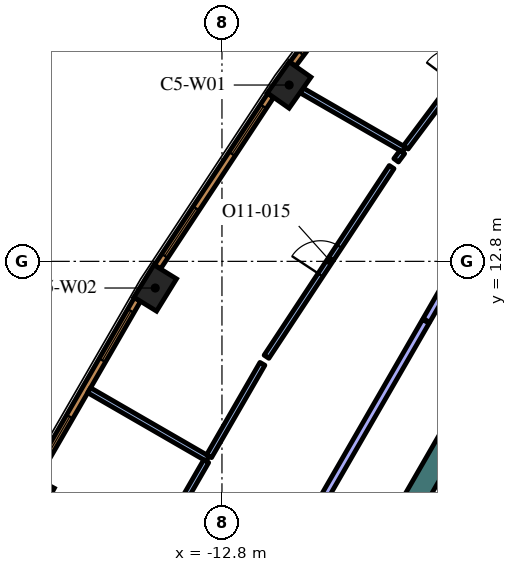
"""IFC4 building model, lengths in metres.
Left out: names, types, materials, properties, quantities, classifications, styles, units other than length and angle.
Written with IfcOpenShell. Run it as: python <this file> out.ifc"""

import sys

from ifc_helpers import new_model, si_unit, direction, frame, frame_2d, origin, origin_2d, place, context, subcontext, project, spatial, rectangle, extrude, element, fill, save


model = new_model("IFC4")
c1 = context("Model", 3, precision=1e-05, world=origin(), true_north=direction((0.0, 1.0)))
c2 = subcontext(c1, "Body", "Model", "MODEL_VIEW")
j1 = project(units=[si_unit("LENGTHUNIT", "METRE"), si_unit("PLANEANGLEUNIT", "RADIAN")], contexts=[c1])
p1 = place(None, origin())
s1 = spatial("IfcSite", under=j1, at=p1, CompositionType="ELEMENT")
p2 = place(p1, origin())
s2 = spatial("IfcBuilding", under=s1, at=p2, CompositionType="ELEMENT")
p3 = place(p2, frame((0.0, 0.0, 275.4)))
s3 = spatial("IfcBuildingStorey", under=s2, at=p3, CompositionType="ELEMENT", Elevation=275.4)
for number, where, z_axis, x_axis in (
    (1, (-11.032, 17.44, 0.0), (0.0, 0.0, 1.0), (-0.575, -0.818, 0.0)),
    (2, (-14.556, 12.098, 0.0), (0.0, 0.0, 1.0), (-0.526, -0.851, 0.0)),
    (3, (-17.756, 6.557, 0.0), (0.0, 0.0, 1.0), (-0.474, -0.881, 0.0)),
):
    element("IfcColumn", number, at=place(p3, frame(where, z_axis=z_axis, x_axis=x_axis)), inside=s3, PredefinedType="COLUMN", context=c2, shape_type="SweptSolid", body=[
        extrude(rectangle(XDim=1.0, YDim=0.7, at=origin_2d()), origin(), (0.0, 0.0, 1.0), 4.2),
    ])
p4 = place(p3, frame((-4.234, 12.566, 0.0), z_axis=(0.0, 0.0, 1.0), x_axis=(-0.499998841866, -0.866026072432, 0.0)))
e4 = element("IfcWall", 4, at=p4, inside=s3, PredefinedType="SOLIDWALL", context=c2, shape_type="SweptSolid", body=[
    extrude(rectangle(XDim=16.694, YDim=0.6, at=frame_2d((8.347, 0.0))), origin(), (0.0, 0.0, 1.0), 4.2),
])
p5 = place(p3, frame((-3.02, 7.419, 0.0), z_axis=(0.0, 0.0, 1.0), x_axis=(-0.500022956343, -0.866012149528, 0.0)))
e5 = element("IfcWall", 5, at=p5, inside=s3, PredefinedType="SOLIDWALL", context=c2, shape_type="SweptSolid", body=[
    extrude(rectangle(XDim=10.08, YDim=0.25, at=frame_2d((5.04, 0.0))), origin(), (0.0, 0.0, 1.0), 4.2),
])
p6 = place(p3, frame((-8.007, 15.74, 0.0), z_axis=(0.0, 0.0, 1.0), x_axis=(-0.866044607523, 0.499966736674, 0.0)))
e6 = element("IfcWall", 6, at=p6, inside=s3, PredefinedType="PARTITIONING", context=c2, shape_type="SweptSolid", body=[
    extrude(rectangle(XDim=3.115, YDim=0.15, at=frame_2d((1.557, 0.0))), origin(), (0.0, 0.0, 1.0), 3.55),
])
p7 = place(p3, frame((-7.962, 15.8, 0.0), z_axis=(0.0, 0.0, 1.0), x_axis=(0.599528135832, 0.800353680785, 0.0)))
e7 = element("IfcWall", 7, at=p7, inside=s3, PredefinedType="PARTITIONING", context=c2, shape_type="SweptSolid", body=[
    extrude(rectangle(XDim=5.217, YDim=0.15, at=frame_2d((2.608, 0.0))), origin(), (0.0, 0.0, 1.0), 3.55),
])
p8 = place(p7, frame((2.116, 0.0, 0.0)))
e8 = element("IfcOpeningElement", 8, at=p8, cuts=e7, PredefinedType="OPENING", context=c2, shape_type="SweptSolid", body=[
    extrude(rectangle(XDim=0.9, YDim=2.1, at=frame_2d((0.45, 1.05))), frame((0.0, 0.085, 0.0), z_axis=(0.0, -1.0, 0.0), x_axis=(1.0, 0.0, 0.0)), (0.0, 0.0, 1.0), 0.17),
])
p9 = place(p3, frame((-13.177, 7.608, 0.0), z_axis=(0.0, 0.0, 1.0), x_axis=(-0.866018442252, 0.500012057535, 0.0)))
e9 = element("IfcWall", 9, at=p9, inside=s3, PredefinedType="PARTITIONING", context=c2, shape_type="SweptSolid", body=[
    extrude(rectangle(XDim=3.6, YDim=0.15, at=frame_2d((1.8, 0.0))), origin(), (0.0, 0.0, 1.0), 3.55),
])
p10 = place(p3, frame((-8.052, 15.679, 0.0), z_axis=(0.0, 0.0, 1.0), x_axis=(-0.599004157744, -0.800745914136, 0.0)))
e10 = element("IfcWall", 10, at=p10, inside=s3, PredefinedType="PARTITIONING", context=c2, shape_type="SweptSolid", body=[
    extrude(rectangle(XDim=0.275, YDim=0.15, at=frame_2d((0.137, 0.0))), origin(), (0.0, 0.0, 1.0), 3.55),
])
p11 = place(p3, frame((-11.628, 10.29, 0.0), z_axis=(0.0, 0.0, 1.0), x_axis=(0.55074607557, 0.834672846236, 0.0)))
e11 = element("IfcWall", 11, at=p11, inside=s3, PredefinedType="PARTITIONING", context=c2, shape_type="SweptSolid", body=[
    extrude(rectangle(XDim=5.979, YDim=0.15, at=frame_2d((2.99, 0.0))), origin(), (0.0, 0.0, 1.0), 3.55),
])
p12 = place(p11, frame((2.58, 0.0, 0.0)))
e12 = element("IfcOpeningElement", 12, at=p12, cuts=e11, PredefinedType="OPENING", context=c2, shape_type="SweptSolid", body=[
    extrude(rectangle(XDim=0.9, YDim=2.1, at=frame_2d((0.45, 1.05))), frame((0.0, 0.085, 0.0), z_axis=(0.0, -1.0, 0.0), x_axis=(1.0, 0.0, 0.0)), (0.0, 0.0, 1.0), 0.17),
])
p13 = place(p3, frame((-11.736, 10.104, 0.0), z_axis=(0.0, 0.0, 1.0), x_axis=(-0.500011000363, -0.866019052629, 0.0)))
e13 = element("IfcWall", 13, at=p13, inside=s3, PredefinedType="PARTITIONING", context=c2, shape_type="SweptSolid", body=[
    extrude(rectangle(XDim=2.808, YDim=0.15, at=frame_2d((1.404, 0.0))), origin(), (0.0, 0.0, 1.0), 3.55),
])
p14 = place(p3, frame((-13.214, 7.543, 0.0), z_axis=(0.0, 0.0, 1.0), x_axis=(-0.499927597274, -0.866067201483, 0.0)))
e14 = element("IfcWall", 14, at=p14, inside=s3, PredefinedType="PARTITIONING", context=c2, shape_type="SweptSolid", body=[
    extrude(rectangle(XDim=3.022, YDim=0.15, at=frame_2d((1.511, 0.0))), origin(), (0.0, 0.0, 1.0), 3.55),
])
p15 = place(p3, frame((-7.436, 11.221, 0.0), z_axis=(0.0, 0.0, 1.0), x_axis=(-0.49999894854, -0.866026010844, 0.0)))
e15 = element("IfcWall", 15, at=p15, inside=s3, PredefinedType="PARTITIONING", context=c2, shape_type="SweptSolid", body=[
    extrude(rectangle(XDim=12.0, YDim=0.2, at=frame_2d((6.0, 0.0))), origin(), (0.0, 0.0, 1.0), 3.55),
])
p16 = place(p15, frame((5.5, 0.0, 0.0)))
e16 = element("IfcOpeningElement", 16, at=p16, cuts=e15, PredefinedType="OPENING", context=c2, shape_type="SweptSolid", body=[
    extrude(rectangle(XDim=1.0, YDim=2.1, at=frame_2d((0.5, 1.05))), frame((0.0, 0.11, 0.0), z_axis=(0.0, -1.0, 0.0), x_axis=(1.0, 0.0, 0.0)), (0.0, 0.0, 1.0), 0.22),
])
p17 = place(p3, frame((-3.306, 18.374, 0.0), z_axis=(0.0, 0.0, 1.0), x_axis=(-0.499999798456, -0.866025520146, 0.0)))
e17 = element("IfcWall", 17, at=p17, inside=s3, PredefinedType="PARTITIONING", context=c2, shape_type="SweptSolid", body=[
    extrude(rectangle(XDim=8.229, YDim=0.2, at=frame_2d((4.115, 0.0))), origin(), (0.0, 0.0, 1.0), 3.55),
])
p18 = place(p3, frame((-7.692, 22.324, 0.0), z_axis=(0.0, 0.0, 1.0), x_axis=(-0.599559865294, -0.800329911929, 0.0)))
e18 = element("IfcWall", 18, at=p18, inside=s3, PredefinedType="SOLIDWALL", context=c2, shape_type="SweptSolid", body=[
    extrude(rectangle(XDim=5.415, YDim=0.19, at=frame_2d((2.708, 0.0))), origin(), (0.0, 0.0, 1.0), 3.95),
])
p19 = place(p18, frame((0.323, 0.0, 0.6)))
e19 = element("IfcOpeningElement", 19, at=p19, cuts=e18, PredefinedType="OPENING", context=c2, shape_type="SweptSolid", body=[
    extrude(rectangle(XDim=1.5, YDim=2.85, at=frame_2d((0.75, 1.425))), frame((0.0, 0.105, 0.0), z_axis=(0.0, -1.0, 0.0), x_axis=(1.0, 0.0, 0.0)), (0.0, 0.0, 1.0), 0.21),
])
p20 = place(p18, frame((3.558, 0.0, 0.6)))
e20 = element("IfcOpeningElement", 20, at=p20, cuts=e18, PredefinedType="OPENING", context=c2, shape_type="SweptSolid", body=[
    extrude(rectangle(XDim=1.5, YDim=2.85, at=frame_2d((0.75, 1.425))), frame((0.0, 0.105, 0.0), z_axis=(0.0, -1.0, 0.0), x_axis=(1.0, 0.0, 0.0)), (0.0, 0.0, 1.0), 0.21),
])
p21 = place(p3, frame((-11.518, 17.166, 0.0), z_axis=(0.0, 0.0, 1.0), x_axis=(-0.550744054781, -0.83467417962, 0.0)))
e21 = element("IfcWall", 21, at=p21, inside=s3, PredefinedType="SOLIDWALL", context=c2, shape_type="SweptSolid", body=[
    extrude(rectangle(XDim=5.406, YDim=0.19, at=frame_2d((2.703, 0.0))), origin(), (0.0, 0.0, 1.0), 3.95),
])
p22 = place(p21, frame((0.346, 0.0, 0.6)))
e22 = element("IfcOpeningElement", 22, at=p22, cuts=e21, PredefinedType="OPENING", context=c2, shape_type="SweptSolid", body=[
    extrude(rectangle(XDim=1.5, YDim=2.85, at=frame_2d((0.75, 1.425))), frame((0.0, 0.105, 0.0), z_axis=(0.0, -1.0, 0.0), x_axis=(1.0, 0.0, 0.0)), (0.0, 0.0, 1.0), 0.21),
])
p23 = place(p21, frame((3.559, 0.0, 0.6)))
e23 = element("IfcOpeningElement", 23, at=p23, cuts=e21, PredefinedType="OPENING", context=c2, shape_type="SweptSolid", body=[
    extrude(rectangle(XDim=1.5, YDim=2.85, at=frame_2d((0.75, 1.425))), frame((0.0, 0.105, 0.0), z_axis=(0.0, -1.0, 0.0), x_axis=(1.0, 0.0, 0.0)), (0.0, 0.0, 1.0), 0.21),
])
p24 = place(p3, frame((-15.025, 11.796, 0.0), z_axis=(0.0, 0.0, 1.0), x_axis=(-0.500024767483, -0.866011103799, 0.0)))
e24 = element("IfcWall", 24, at=p24, inside=s3, PredefinedType="SOLIDWALL", context=c2, shape_type="SweptSolid", body=[
    extrude(rectangle(XDim=5.406, YDim=0.19, at=frame_2d((2.703, 0.0))), origin(), (0.0, 0.0, 1.0), 3.95),
])
p25 = place(p24, frame((0.346, 0.0, 0.6)))
e25 = element("IfcOpeningElement", 25, at=p25, cuts=e24, PredefinedType="OPENING", context=c2, shape_type="SweptSolid", body=[
    extrude(rectangle(XDim=1.5, YDim=2.85, at=frame_2d((0.75, 1.425))), frame((0.0, 0.105, 0.0), z_axis=(0.0, -1.0, 0.0), x_axis=(1.0, 0.0, 0.0)), (0.0, 0.0, 1.0), 0.21),
])
p26 = place(p24, frame((3.559, 0.0, 0.6)))
e26 = element("IfcOpeningElement", 26, at=p26, cuts=e24, PredefinedType="OPENING", context=c2, shape_type="SweptSolid", body=[
    extrude(rectangle(XDim=1.5, YDim=2.85, at=frame_2d((0.75, 1.425))), frame((0.0, 0.105, 0.0), z_axis=(0.0, -1.0, 0.0), x_axis=(1.0, 0.0, 0.0)), (0.0, 0.0, 1.0), 0.21),
])
p27 = place(p12, origin())
e27 = element("IfcDoor", 27, at=p27, inside=s3, OperationType="SINGLE_SWING_RIGHT", PredefinedType="DOOR", context=c2, shape_type="SweptSolid", body=[
    extrude(rectangle(XDim=0.9, YDim=2.1, at=frame_2d((0.45, 1.05))), frame((0.0, 0.025, 0.0), z_axis=(0.0, -1.0, 0.0), x_axis=(1.0, 0.0, 0.0)), (0.0, 0.0, 1.0), 0.05),
])
fill(e12, e27)
p28 = place(p20, origin())
e28 = element("IfcWindow", 28, at=p28, inside=s3, PartitioningType="SINGLE_PANEL", PredefinedType="WINDOW", context=c2, shape_type="SweptSolid", body=[
    extrude(rectangle(XDim=1.5, YDim=2.85, at=frame_2d((0.75, 1.425))), frame((0.0, 0.045, 0.0), z_axis=(0.0, -1.0, 0.0), x_axis=(1.0, 0.0, 0.0)), (0.0, 0.0, 1.0), 0.06),
])
fill(e20, e28)
p29 = place(p22, origin())
e29 = element("IfcWindow", 29, at=p29, inside=s3, PartitioningType="SINGLE_PANEL", PredefinedType="WINDOW", context=c2, shape_type="SweptSolid", body=[
    extrude(rectangle(XDim=1.5, YDim=2.85, at=frame_2d((0.75, 1.425))), frame((0.0, 0.045, 0.0), z_axis=(0.0, -1.0, 0.0), x_axis=(1.0, 0.0, 0.0)), (0.0, 0.0, 1.0), 0.06),
])
fill(e22, e29)
p30 = place(p23, origin())
e30 = element("IfcWindow", 30, at=p30, inside=s3, PartitioningType="SINGLE_PANEL", PredefinedType="WINDOW", context=c2, shape_type="SweptSolid", body=[
    extrude(rectangle(XDim=1.5, YDim=2.85, at=frame_2d((0.75, 1.425))), frame((0.0, 0.045, 0.0), z_axis=(0.0, -1.0, 0.0), x_axis=(1.0, 0.0, 0.0)), (0.0, 0.0, 1.0), 0.06),
])
fill(e23, e30)
p31 = place(p25, origin())
e31 = element("IfcWindow", 31, at=p31, inside=s3, PartitioningType="SINGLE_PANEL", PredefinedType="WINDOW", context=c2, shape_type="SweptSolid", body=[
    extrude(rectangle(XDim=1.5, YDim=2.85, at=frame_2d((0.75, 1.425))), frame((0.0, 0.045, 0.0), z_axis=(0.0, -1.0, 0.0), x_axis=(1.0, 0.0, 0.0)), (0.0, 0.0, 1.0), 0.06),
])
fill(e25, e31)
p32 = place(p26, origin())
e32 = element("IfcWindow", 32, at=p32, inside=s3, PartitioningType="SINGLE_PANEL", PredefinedType="WINDOW", context=c2, shape_type="SweptSolid", body=[
    extrude(rectangle(XDim=1.5, YDim=2.85, at=frame_2d((0.75, 1.425))), frame((0.0, 0.045, 0.0), z_axis=(0.0, -1.0, 0.0), x_axis=(1.0, 0.0, 0.0)), (0.0, 0.0, 1.0), 0.06),
])
fill(e26, e32)
save(model, sys.argv[1])
